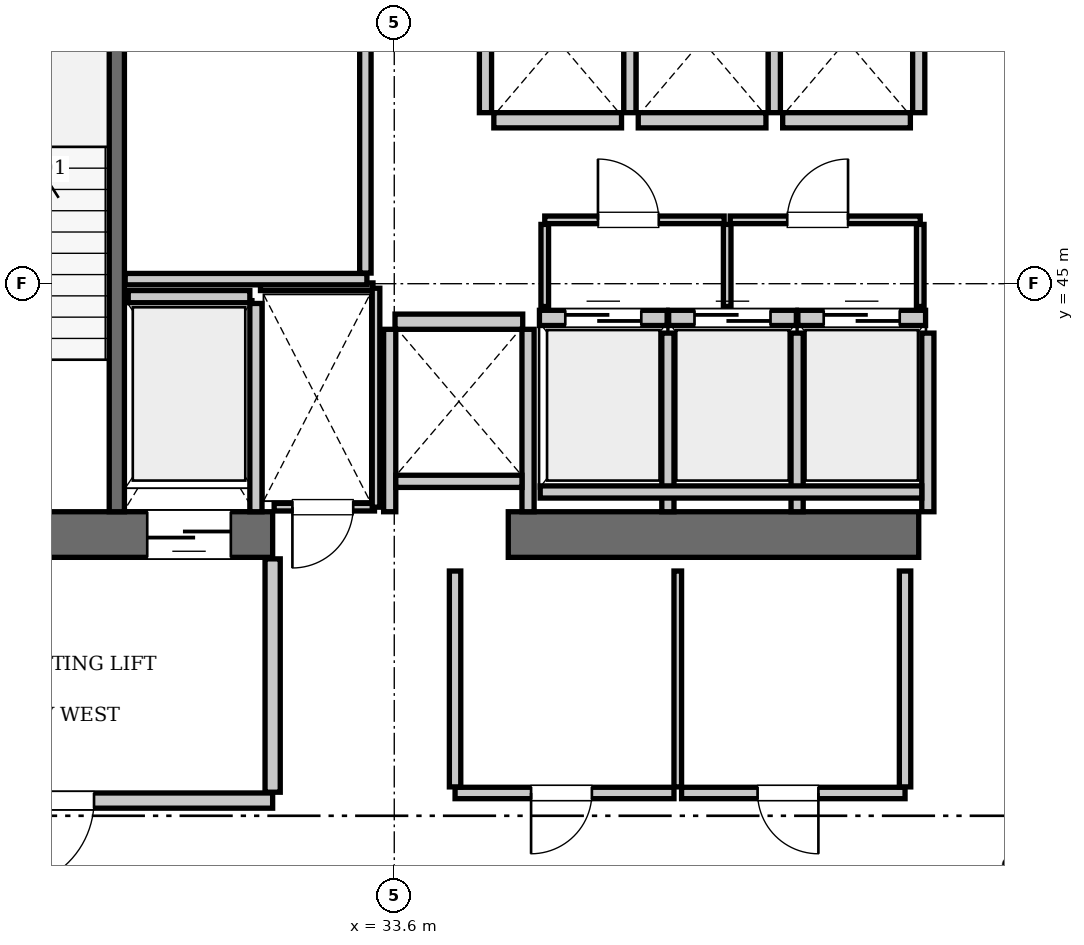
"""IFC4 building model, lengths in metres.
Left out: names, types, materials, properties, quantities, classifications, styles, units other than length and angle.
Written with IfcOpenShell. Run it as: python <this file> out.ifc"""

import sys

from ifc_helpers import new_model, si_unit, direction, frame, frame_2d, origin, place, context, subcontext, project, spatial, rectangle, extrude, element, fill, save


model = new_model("IFC4")
c1 = context("Model", 3, precision=1e-05, world=origin(), true_north=direction((0.0, 1.0)))
c2 = subcontext(c1, "Body", "Model", "MODEL_VIEW")
j1 = project(units=[si_unit("LENGTHUNIT", "METRE"), si_unit("PLANEANGLEUNIT", "RADIAN")], contexts=[c1])
p1 = place(None, origin())
s1 = spatial("IfcSite", under=j1, at=p1, CompositionType="ELEMENT")
p2 = place(p1, origin())
s2 = spatial("IfcBuilding", under=s1, at=p2, CompositionType="ELEMENT")
p3 = place(p2, frame((0.0, 0.0, 243.25)))
s3 = spatial("IfcBuildingStorey", under=s2, at=p3, CompositionType="ELEMENT", Elevation=243.25)
p4 = place(p3, frame((25.2, 41.7, 0.0), z_axis=(0.0, 0.0, 1.0), x_axis=(1.0, 0.0, 0.0)))
e1 = element("IfcWall", 1, at=p4, inside=s3, PredefinedType="SHEAR", context=c2, shape_type="SweptSolid", body=[
    extrude(rectangle(XDim=6.8, YDim=0.6, at=frame_2d((3.4, 0.0))), origin(), (0.0, 0.0, 1.0), 3.85),
])
p5 = place(p4, frame((1.65, 0.0, 0.0)))
e2 = element("IfcOpeningElement", 2, at=p5, cuts=e1, PredefinedType="OPENING", context=c2, shape_type="SweptSolid", body=[
    extrude(rectangle(XDim=1.15, YDim=2.15, at=frame_2d((0.575, 1.075))), frame((0.0, 0.31, 0.0), z_axis=(0.0, -1.0, 0.0), x_axis=(1.0, 0.0, 0.0)), (0.0, 0.0, 1.0), 0.62),
])
p6 = place(p4, frame((5.15, 0.0, 0.0)))
e3 = element("IfcOpeningElement", 3, at=p6, cuts=e1, PredefinedType="OPENING", context=c2, shape_type="SweptSolid", body=[
    extrude(rectangle(XDim=1.1, YDim=2.2, at=frame_2d((0.55, 1.1))), frame((0.0, 0.31, 0.0), z_axis=(0.0, -1.0, 0.0), x_axis=(1.0, 0.0, 0.0)), (0.0, 0.0, 1.0), 0.62),
])
p7 = place(p3, frame((35.1, 41.7, 0.0), z_axis=(0.0, 0.0, 1.0), x_axis=(1.0, 0.0, 0.0)))
e4 = element("IfcWall", 4, at=p7, inside=s3, PredefinedType="SHEAR", context=c2, shape_type="SweptSolid", body=[
    extrude(rectangle(XDim=5.4, YDim=0.6, at=frame_2d((2.7, 0.0))), origin(), (0.0, 0.0, 1.0), 3.85),
])
p8 = place(p3, frame((29.95, 42.0, 0.0), z_axis=(0.0, 0.0, 1.0), x_axis=(0.0, 1.0, 0.0)))
e5 = element("IfcWall", 5, at=p8, inside=s3, PredefinedType="SOLIDWALL", context=c2, shape_type="SweptSolid", body=[
    extrude(rectangle(XDim=9.15, YDim=0.2, at=frame_2d((4.575, 0.0))), origin(), (0.0, 0.0, 1.0), 3.61),
])
p9 = place(p3, frame((35.51, 44.55, 0.0), z_axis=(0.0, 0.0, 1.0), x_axis=(1.0, 0.0, 0.0)))
e6 = element("IfcWall", 6, at=p9, inside=s3, PredefinedType="SOLIDWALL", context=c2, shape_type="SweptSolid", body=[
    extrude(rectangle(XDim=1.68, YDim=0.2, at=frame_2d((0.84, 0.0))), origin(), (0.0, 0.0, 1.0), 3.61),
])
p10 = place(p9, frame((0.34, 0.0, 0.0)))
e7 = element("IfcOpeningElement", 7, at=p10, cuts=e6, PredefinedType="OPENING", context=c2, shape_type="SweptSolid", body=[
    extrude(rectangle(XDim=1.0, YDim=2.15, at=frame_2d((0.5, 1.075))), frame((0.0, 0.11, 0.0), z_axis=(0.0, -1.0, 0.0), x_axis=(1.0, 0.0, 0.0)), (0.0, 0.0, 1.0), 0.22),
])
p11 = place(p3, frame((37.21, 44.55, 0.0), z_axis=(0.0, 0.0, 1.0), x_axis=(1.0, 0.0, 0.0)))
e8 = element("IfcWall", 8, at=p11, inside=s3, PredefinedType="SOLIDWALL", context=c2, shape_type="SweptSolid", body=[
    extrude(rectangle(XDim=1.68, YDim=0.2, at=frame_2d((0.84, 0.0))), origin(), (0.0, 0.0, 1.0), 3.61),
])
p12 = place(p11, frame((0.34, 0.0, 0.0)))
e9 = element("IfcOpeningElement", 9, at=p12, cuts=e8, PredefinedType="OPENING", context=c2, shape_type="SweptSolid", body=[
    extrude(rectangle(XDim=1.0, YDim=2.15, at=frame_2d((0.5, 1.075))), frame((0.0, 0.11, 0.0), z_axis=(0.0, -1.0, 0.0), x_axis=(1.0, 0.0, 0.0)), (0.0, 0.0, 1.0), 0.22),
])
p13 = place(p3, frame((38.91, 44.55, 0.0), z_axis=(0.0, 0.0, 1.0), x_axis=(1.0, 0.0, 0.0)))
e10 = element("IfcWall", 10, at=p13, inside=s3, PredefinedType="SOLIDWALL", context=c2, shape_type="SweptSolid", body=[
    extrude(rectangle(XDim=1.68, YDim=0.2, at=frame_2d((0.84, 0.0))), origin(), (0.0, 0.0, 1.0), 3.61),
])
p14 = place(p13, frame((0.34, 0.0, 0.0)))
e11 = element("IfcOpeningElement", 11, at=p14, cuts=e10, PredefinedType="OPENING", context=c2, shape_type="SweptSolid", body=[
    extrude(rectangle(XDim=1.0, YDim=2.15, at=frame_2d((0.5, 1.075))), frame((0.0, 0.11, 0.0), z_axis=(0.0, -1.0, 0.0), x_axis=(1.0, 0.0, 0.0)), (0.0, 0.0, 1.0), 0.22),
])
p15 = place(p3, frame((34.91, 47.15, 0.0), z_axis=(0.0, 0.0, 1.0), x_axis=(1.0, 0.0, 0.0)))
e12 = element("IfcWall", 12, at=p15, inside=s3, PredefinedType="SOLIDWALL", context=c2, shape_type="SweptSolid", body=[
    extrude(rectangle(XDim=1.68, YDim=0.2, at=frame_2d((0.84, 0.0))), origin(), (0.0, 0.0, 1.0), 3.61),
])
for number, where, z_axis, x_axis in (
    (13, (36.81, 47.15, 0.0), (0.0, 0.0, 1.0), (1.0, 0.0, 0.0)),
    (14, (38.71, 47.15, 0.0), (0.0, 0.0, 1.0), (1.0, 0.0, 0.0)),
    (15, (33.61, 44.5, 0.0), (0.0, 0.0, 1.0), (1.0, 0.0, 0.0)),
):
    element("IfcWall", number, at=place(p3, frame(where, z_axis=z_axis, x_axis=x_axis)), inside=s3, PredefinedType="SOLIDWALL", context=c2, shape_type="SweptSolid", body=[
        extrude(rectangle(XDim=1.68, YDim=0.2, at=frame_2d((0.84, 0.0))), origin(), (0.0, 0.0, 1.0), 3.61),
    ])
p16 = place(p3, frame((30.1, 44.83, 0.0), z_axis=(0.0, 0.0, 1.0), x_axis=(1.0, 0.0, 0.0)))
e16 = element("IfcWall", 16, at=p16, inside=s3, PredefinedType="SOLIDWALL", context=c2, shape_type="SweptSolid", body=[
    extrude(rectangle(XDim=1.6, YDim=0.16, at=frame_2d((0.8, 0.0))), origin(), (0.0, 0.0, 1.0), 3.61),
])
p17 = place(p3, frame((31.78, 42.0, 0.0), z_axis=(0.0, 0.0, 1.0), x_axis=(0.0, 1.0, 0.0)))
e17 = element("IfcWall", 17, at=p17, inside=s3, PredefinedType="SOLIDWALL", context=c2, shape_type="SweptSolid", body=[
    extrude(rectangle(XDim=2.74, YDim=0.16, at=frame_2d((1.37, 0.0))), origin(), (0.0, 0.0, 1.0), 3.61),
])
for number, where, z_axis, x_axis in (
    (18, (37.2, 42.0, 0.0), (0.0, 0.0, 1.0), (0.0, 1.0, 0.0)),
    (19, (38.9, 42.0, 0.0), (0.0, 0.0, 1.0), (0.0, 1.0, 0.0)),
    (20, (40.62, 42.0, 0.0), (0.0, 0.0, 1.0), (0.0, 1.0, 0.0)),
):
    element("IfcWall", number, at=place(p3, frame(where, z_axis=z_axis, x_axis=x_axis)), inside=s3, PredefinedType="SOLIDWALL", context=c2, shape_type="SweptSolid", body=[
        extrude(rectangle(XDim=2.35, YDim=0.16, at=frame_2d((1.175, 0.0))), origin(), (0.0, 0.0, 1.0), 3.61),
    ])
p18 = place(p3, frame((35.52, 42.26, 0.0), z_axis=(0.0, 0.0, 1.0), x_axis=(1.0, 0.0, 0.0)))
e21 = element("IfcWall", 21, at=p18, inside=s3, PredefinedType="SOLIDWALL", context=c2, shape_type="SweptSolid", body=[
    extrude(rectangle(XDim=5.02, YDim=0.16, at=frame_2d((2.51, 0.0))), origin(), (0.0, 0.0, 1.0), 3.61),
])
for number, where, z_axis, x_axis in (
    (22, (34.8, 47.25, 0.0), (0.0, 0.0, 1.0), (0.0, 1.0, 0.0)),
    (23, (36.7, 47.25, 0.0), (0.0, 0.0, 1.0), (0.0, 1.0, 0.0)),
    (24, (38.6, 47.25, 0.0), (0.0, 0.0, 1.0), (0.0, 1.0, 0.0)),
    (25, (40.5, 47.25, 0.0), (0.0, 0.0, 1.0), (0.0, 1.0, 0.0)),
):
    element("IfcWall", number, at=place(p3, frame(where, z_axis=z_axis, x_axis=x_axis)), inside=s3, PredefinedType="SOLIDWALL", context=c2, shape_type="SweptSolid", body=[
        extrude(rectangle(XDim=2.19, YDim=0.16, at=frame_2d((1.095, 0.0))), origin(), (0.0, 0.0, 1.0), 3.61),
    ])
for number, where, z_axis, x_axis in (
    (26, (33.54, 42.0, 0.0), (0.0, 0.0, 1.0), (0.0, 1.0, 0.0)),
    (27, (35.36, 42.0, 0.0), (0.0, 0.0, 1.0), (0.0, 1.0, 0.0)),
):
    element("IfcWall", number, at=place(p3, frame(where, z_axis=z_axis, x_axis=x_axis)), inside=s3, PredefinedType="SOLIDWALL", context=c2, shape_type="SweptSolid", body=[
        extrude(rectangle(XDim=2.4, YDim=0.16, at=frame_2d((1.2, 0.0))), origin(), (0.0, 0.0, 1.0), 3.61),
    ])
p19 = place(p3, frame((33.62, 42.4, 0.0), z_axis=(0.0, 0.0, 1.0), x_axis=(1.0, 0.0, 0.0)))
e28 = element("IfcWall", 28, at=p19, inside=s3, PredefinedType="SOLIDWALL", context=c2, shape_type="SweptSolid", body=[
    extrude(rectangle(XDim=1.66, YDim=0.16, at=frame_2d((0.83, 0.0))), origin(), (0.0, 0.0, 1.0), 3.61),
])
p20 = place(p3, frame((26.2, 38.2, 0.0), z_axis=(0.0, 0.0, 1.0), x_axis=(1.0, 0.0, 0.0)))
e29 = element("IfcWall", 29, at=p20, inside=s3, PredefinedType="PARTITIONING", context=c2, shape_type="SweptSolid", body=[
    extrude(rectangle(XDim=5.8, YDim=0.2, at=frame_2d((2.9, 0.0))), origin(), (0.0, 0.0, 1.0), 3.61),
])
p21 = place(p20, frame((2.3, 0.0, 0.0)))
e30 = element("IfcOpeningElement", 30, at=p21, cuts=e29, PredefinedType="OPENING", context=c2, shape_type="SweptSolid", body=[
    extrude(rectangle(XDim=1.15, YDim=2.15, at=frame_2d((0.575, 1.075))), frame((0.0, 0.11, 0.0), z_axis=(0.0, -1.0, 0.0), x_axis=(1.0, 0.0, 0.0)), (0.0, 0.0, 1.0), 0.22),
])
p22 = place(p3, frame((32.0, 38.31, 0.0), z_axis=(0.0, 0.0, 1.0), x_axis=(0.0, 1.0, 0.0)))
e31 = element("IfcWall", 31, at=p22, inside=s3, PredefinedType="PARTITIONING", context=c2, shape_type="SweptSolid", body=[
    extrude(rectangle(XDim=3.07, YDim=0.2, at=frame_2d((1.535, 0.0))), origin(), (0.0, 0.0, 1.0), 3.61),
])
p23 = place(p3, frame((32.02, 42.06, 0.0), z_axis=(0.0, 0.0, 1.0), x_axis=(1.0, 0.0, 0.0)))
e32 = element("IfcWall", 32, at=p23, inside=s3, PredefinedType="PARTITIONING", context=c2, shape_type="SweptSolid", body=[
    extrude(rectangle(XDim=1.32, YDim=0.1, at=frame_2d((0.66, 0.0))), origin(), (0.0, 0.0, 1.0), 3.61),
])
p24 = place(p23, frame((0.24, 0.0, 0.0)))
e33 = element("IfcOpeningElement", 33, at=p24, cuts=e32, PredefinedType="OPENING", context=c2, shape_type="SweptSolid", body=[
    extrude(rectangle(XDim=0.8, YDim=2.05, at=frame_2d((0.4, 1.025))), frame((0.0, 0.06, 0.0), z_axis=(0.0, -1.0, 0.0), x_axis=(1.0, 0.0, 0.0)), (0.0, 0.0, 1.0), 0.12),
])
p25 = place(p3, frame((31.84, 44.96, 0.0), z_axis=(0.0, 0.0, 1.0), x_axis=(1.0, 0.0, 0.0)))
e34 = element("IfcWall", 34, at=p25, inside=s3, PredefinedType="PARTITIONING", context=c2, shape_type="SweptSolid", body=[
    extrude(rectangle(XDim=1.48, YDim=0.1, at=frame_2d((0.74, 0.0))), origin(), (0.0, 0.0, 1.0), 3.61),
])
p26 = place(p3, frame((33.36, 42.06, 0.0), z_axis=(0.0, 0.0, 1.0), x_axis=(0.0, 1.0, 0.0)))
e35 = element("IfcWall", 35, at=p26, inside=s3, PredefinedType="PARTITIONING", context=c2, shape_type="SweptSolid", body=[
    extrude(rectangle(XDim=2.88, YDim=0.1, at=frame_2d((1.44, 0.0))), origin(), (0.0, 0.0, 1.0), 3.61),
])
p27 = place(p3, frame((35.58, 45.84, 0.0), z_axis=(0.0, 0.0, 1.0), x_axis=(1.0, 0.0, 0.0)))
e36 = element("IfcWall", 36, at=p27, inside=s3, PredefinedType="PARTITIONING", context=c2, shape_type="SweptSolid", body=[
    extrude(rectangle(XDim=2.36, YDim=0.1, at=frame_2d((1.18, 0.0))), origin(), (0.0, 0.0, 1.0), 3.61),
])
p28 = place(p27, frame((0.7, 0.0, 0.0)))
e37 = element("IfcOpeningElement", 37, at=p28, cuts=e36, PredefinedType="OPENING", context=c2, shape_type="SweptSolid", body=[
    extrude(rectangle(XDim=0.8, YDim=2.05, at=frame_2d((0.4, 1.025))), frame((0.0, 0.06, 0.0), z_axis=(0.0, -1.0, 0.0), x_axis=(1.0, 0.0, 0.0)), (0.0, 0.0, 1.0), 0.12),
])
p29 = place(p3, frame((38.02, 45.84, 0.0), z_axis=(0.0, 0.0, 1.0), x_axis=(1.0, 0.0, 0.0)))
e38 = element("IfcWall", 38, at=p29, inside=s3, PredefinedType="PARTITIONING", context=c2, shape_type="SweptSolid", body=[
    extrude(rectangle(XDim=2.5, YDim=0.1, at=frame_2d((1.25, 0.0))), origin(), (0.0, 0.0, 1.0), 3.61),
])
p30 = place(p29, frame((0.75, 0.0, 0.0)))
e39 = element("IfcOpeningElement", 39, at=p30, cuts=e38, PredefinedType="OPENING", context=c2, shape_type="SweptSolid", body=[
    extrude(rectangle(XDim=0.8, YDim=2.05, at=frame_2d((0.4, 1.025))), frame((0.0, 0.06, 0.0), z_axis=(0.0, -1.0, 0.0), x_axis=(1.0, 0.0, 0.0)), (0.0, 0.0, 1.0), 0.12),
])
for number, where, z_axis, x_axis in (
    (40, (35.58, 44.7, 0.0), (0.0, 0.0, 1.0), (0.0, 1.0, 0.0)),
    (41, (37.98, 44.7, 0.0), (0.0, 0.0, 1.0), (0.0, 1.0, 0.0)),
    (42, (40.52, 44.7, 0.0), (0.0, 0.0, 1.0), (0.0, 1.0, 0.0)),
):
    element("IfcWall", number, at=place(p3, frame(where, z_axis=z_axis, x_axis=x_axis)), inside=s3, PredefinedType="PARTITIONING", context=c2, shape_type="SweptSolid", body=[
        extrude(rectangle(XDim=1.08, YDim=0.1, at=frame_2d((0.54, 0.0))), origin(), (0.0, 0.0, 1.0), 3.61),
    ])
p31 = place(p3, frame((30.06, 45.06, 0.0), z_axis=(0.0, 0.0, 1.0), x_axis=(1.0, 0.0, 0.0)))
e43 = element("IfcWall", 43, at=p31, inside=s3, PredefinedType="PARTITIONING", context=c2, shape_type="SweptSolid", body=[
    extrude(rectangle(XDim=3.18, YDim=0.15, at=frame_2d((1.59, 0.0))), origin(), (0.0, 0.0, 1.0), 3.61),
])
p32 = place(p3, frame((33.22, 45.14, 0.0), z_axis=(0.0, 0.0, 1.0), x_axis=(0.0, 1.0, 0.0)))
e44 = element("IfcWall", 44, at=p32, inside=s3, PredefinedType="PARTITIONING", context=c2, shape_type="SweptSolid", body=[
    extrude(rectangle(XDim=4.16, YDim=0.15, at=frame_2d((2.08, 0.0))), origin(), (0.0, 0.0, 1.0), 3.61),
])
p33 = place(p3, frame((34.4, 38.3, 0.0), z_axis=(0.0, 0.0, 1.0), x_axis=(1.0, 0.0, 0.0)))
e45 = element("IfcWall", 45, at=p33, inside=s3, PredefinedType="PARTITIONING", context=c2, shape_type="SweptSolid", body=[
    extrude(rectangle(XDim=2.88, YDim=0.15, at=frame_2d((1.44, 0.0))), origin(), (0.0, 0.0, 1.0), 3.61),
])
p34 = place(p33, frame((1.0, 0.0, 0.0)))
e46 = element("IfcOpeningElement", 46, at=p34, cuts=e45, PredefinedType="OPENING", context=c2, shape_type="SweptSolid", body=[
    extrude(rectangle(XDim=0.8, YDim=2.05, at=frame_2d((0.4, 1.025))), frame((0.0, 0.085, 0.0), z_axis=(0.0, -1.0, 0.0), x_axis=(1.0, 0.0, 0.0)), (0.0, 0.0, 1.0), 0.17),
])
p35 = place(p3, frame((37.38, 38.3, 0.0), z_axis=(0.0, 0.0, 1.0), x_axis=(1.0, 0.0, 0.0)))
e47 = element("IfcWall", 47, at=p35, inside=s3, PredefinedType="PARTITIONING", context=c2, shape_type="SweptSolid", body=[
    extrude(rectangle(XDim=2.94, YDim=0.15, at=frame_2d((1.47, 0.0))), origin(), (0.0, 0.0, 1.0), 3.61),
])
p36 = place(p35, frame((1.0, 0.0, 0.0)))
e48 = element("IfcOpeningElement", 48, at=p36, cuts=e47, PredefinedType="OPENING", context=c2, shape_type="SweptSolid", body=[
    extrude(rectangle(XDim=0.8, YDim=2.05, at=frame_2d((0.4, 1.025))), frame((0.0, 0.085, 0.0), z_axis=(0.0, -1.0, 0.0), x_axis=(1.0, 0.0, 0.0)), (0.0, 0.0, 1.0), 0.17),
])
p37 = place(p3, frame((34.4, 38.38, 0.0), z_axis=(0.0, 0.0, 1.0), x_axis=(0.0, 1.0, 0.0)))
e49 = element("IfcWall", 49, at=p37, inside=s3, PredefinedType="PARTITIONING", context=c2, shape_type="SweptSolid", body=[
    extrude(rectangle(XDim=2.84, YDim=0.15, at=frame_2d((1.42, 0.0))), origin(), (0.0, 0.0, 1.0), 3.61),
])
p38 = place(p3, frame((37.33, 38.38, 0.0), z_axis=(0.0, 0.0, 1.0), x_axis=(0.0, 1.0, 0.0)))
e50 = element("IfcWall", 50, at=p38, inside=s3, PredefinedType="PARTITIONING", context=c2, shape_type="SweptSolid", body=[
    extrude(rectangle(XDim=2.84, YDim=0.1, at=frame_2d((1.42, 0.0))), origin(), (0.0, 0.0, 1.0), 3.61),
])
p39 = place(p3, frame((40.32, 38.38, 0.0), z_axis=(0.0, 0.0, 1.0), x_axis=(0.0, 1.0, 0.0)))
e51 = element("IfcWall", 51, at=p39, inside=s3, PredefinedType="PARTITIONING", context=c2, shape_type="SweptSolid", body=[
    extrude(rectangle(XDim=2.84, YDim=0.15, at=frame_2d((1.42, 0.0))), origin(), (0.0, 0.0, 1.0), 3.61),
])
p40 = place(p10, origin())
e52 = element("IfcDoor", 52, at=p40, inside=s3, OperationType="SLIDING_TO_LEFT", PredefinedType="DOOR", context=c2, shape_type="SweptSolid", body=[
    extrude(rectangle(XDim=1.0, YDim=2.15, at=frame_2d((0.5, 1.075))), frame((0.0, 0.025, 0.0), z_axis=(0.0, -1.0, 0.0), x_axis=(1.0, 0.0, 0.0)), (0.0, 0.0, 1.0), 0.05),
])
fill(e7, e52)
p41 = place(p12, origin())
e53 = element("IfcDoor", 53, at=p41, inside=s3, OperationType="SLIDING_TO_LEFT", PredefinedType="DOOR", context=c2, shape_type="SweptSolid", body=[
    extrude(rectangle(XDim=1.0, YDim=2.15, at=frame_2d((0.5, 1.075))), frame((0.0, 0.025, 0.0), z_axis=(0.0, -1.0, 0.0), x_axis=(1.0, 0.0, 0.0)), (0.0, 0.0, 1.0), 0.05),
])
fill(e9, e53)
p42 = place(p14, origin())
e54 = element("IfcDoor", 54, at=p42, inside=s3, OperationType="SLIDING_TO_LEFT", PredefinedType="DOOR", context=c2, shape_type="SweptSolid", body=[
    extrude(rectangle(XDim=1.0, YDim=2.15, at=frame_2d((0.5, 1.075))), frame((0.0, 0.025, 0.0), z_axis=(0.0, -1.0, 0.0), x_axis=(1.0, 0.0, 0.0)), (0.0, 0.0, 1.0), 0.05),
])
fill(e11, e54)
p43 = place(p6, frame((1.1, 0.0, 0.0), z_axis=(0.0, 0.0, 1.0), x_axis=(-1.0, 0.0, 0.0)))
e55 = element("IfcDoor", 55, at=p43, inside=s3, OperationType="SLIDING_TO_LEFT", PredefinedType="DOOR", context=c2, shape_type="SweptSolid", body=[
    extrude(rectangle(XDim=1.1, YDim=2.2, at=frame_2d((0.55, 1.1))), frame((0.0, 0.025, 0.0), z_axis=(0.0, -1.0, 0.0), x_axis=(1.0, 0.0, 0.0)), (0.0, 0.0, 1.0), 0.05),
])
fill(e3, e55)
p44 = place(p21, frame((1.15, 0.0, 0.0), z_axis=(0.0, 0.0, 1.0), x_axis=(-1.0, 0.0, 0.0)))
e56 = element("IfcDoor", 56, at=p44, inside=s3, OperationType="SINGLE_SWING_RIGHT", PredefinedType="DOOR", context=c2, shape_type="SweptSolid", body=[
    extrude(rectangle(XDim=1.15, YDim=2.15, at=frame_2d((0.575, 1.075))), frame((0.0, 0.025, 0.0), z_axis=(0.0, -1.0, 0.0), x_axis=(1.0, 0.0, 0.0)), (0.0, 0.0, 1.0), 0.05),
])
fill(e30, e56)
p45 = place(p24, frame((0.8, 0.0, 0.0), z_axis=(0.0, 0.0, 1.0), x_axis=(-1.0, 0.0, 0.0)))
e57 = element("IfcDoor", 57, at=p45, inside=s3, OperationType="SINGLE_SWING_RIGHT", PredefinedType="DOOR", context=c2, shape_type="SweptSolid", body=[
    extrude(rectangle(XDim=0.8, YDim=2.05, at=frame_2d((0.4, 1.025))), frame((0.0, 0.025, 0.0), z_axis=(0.0, -1.0, 0.0), x_axis=(1.0, 0.0, 0.0)), (0.0, 0.0, 1.0), 0.05),
])
fill(e33, e57)
p46 = place(p28, origin())
e58 = element("IfcDoor", 58, at=p46, inside=s3, OperationType="SINGLE_SWING_LEFT", PredefinedType="DOOR", context=c2, shape_type="SweptSolid", body=[
    extrude(rectangle(XDim=0.8, YDim=2.05, at=frame_2d((0.4, 1.025))), frame((0.0, 0.025, 0.0), z_axis=(0.0, -1.0, 0.0), x_axis=(1.0, 0.0, 0.0)), (0.0, 0.0, 1.0), 0.05),
])
fill(e37, e58)
p47 = place(p30, origin())
e59 = element("IfcDoor", 59, at=p47, inside=s3, OperationType="SINGLE_SWING_RIGHT", PredefinedType="DOOR", context=c2, shape_type="SweptSolid", body=[
    extrude(rectangle(XDim=0.8, YDim=2.05, at=frame_2d((0.4, 1.025))), frame((0.0, 0.025, 0.0), z_axis=(0.0, -1.0, 0.0), x_axis=(1.0, 0.0, 0.0)), (0.0, 0.0, 1.0), 0.05),
])
fill(e39, e59)
p48 = place(p34, frame((0.8, 0.0, 0.0), z_axis=(0.0, 0.0, 1.0), x_axis=(-1.0, 0.0, 0.0)))
e60 = element("IfcDoor", 60, at=p48, inside=s3, OperationType="SINGLE_SWING_RIGHT", PredefinedType="DOOR", context=c2, shape_type="SweptSolid", body=[
    extrude(rectangle(XDim=0.8, YDim=2.05, at=frame_2d((0.4, 1.025))), frame((0.0, 0.025, 0.0), z_axis=(0.0, -1.0, 0.0), x_axis=(1.0, 0.0, 0.0)), (0.0, 0.0, 1.0), 0.05),
])
fill(e46, e60)
p49 = place(p36, frame((0.8, 0.0, 0.0), z_axis=(0.0, 0.0, 1.0), x_axis=(-1.0, 0.0, 0.0)))
e61 = element("IfcDoor", 61, at=p49, inside=s3, OperationType="SINGLE_SWING_LEFT", PredefinedType="DOOR", context=c2, shape_type="SweptSolid", body=[
    extrude(rectangle(XDim=0.8, YDim=2.05, at=frame_2d((0.4, 1.025))), frame((0.0, 0.025, 0.0), z_axis=(0.0, -1.0, 0.0), x_axis=(1.0, 0.0, 0.0)), (0.0, 0.0, 1.0), 0.05),
])
fill(e48, e61)
save(model, sys.argv[1])
